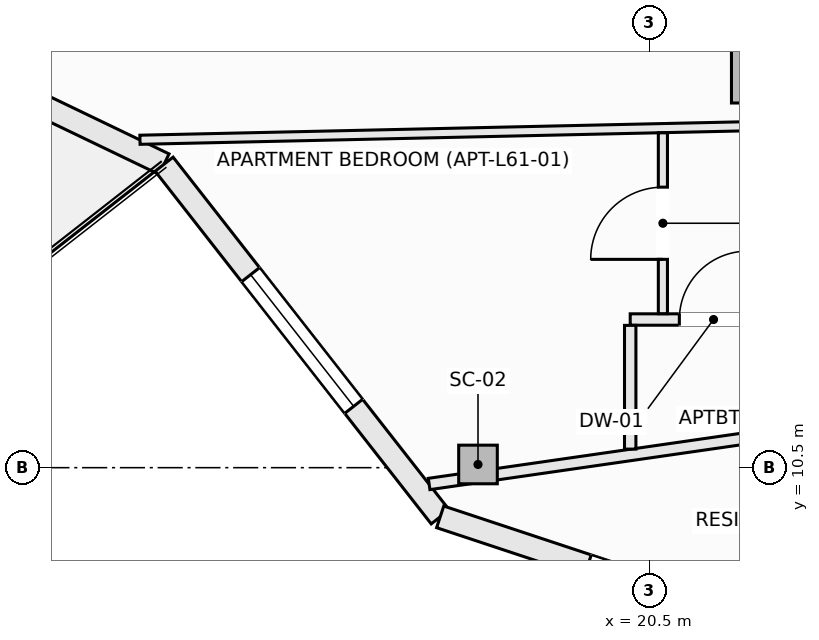
"""IFC4 building model, lengths in metres.
Left out: names, types, materials, properties, quantities, classifications, styles, units other than length and angle.
Written with IfcOpenShell. Run it as: python <this file> out.ifc"""

import sys

from ifc_helpers import new_model, si_unit, direction, frame, frame_2d, origin, origin_2d, place, context, subcontext, project, spatial, rectangle, hollow_rectangle, extrude, element, fill, save


model = new_model("IFC4")
c1 = context("Model", 3, precision=1e-05, world=origin(), true_north=direction((0.0, 1.0)))
c2 = subcontext(c1, "Body", "Model", "MODEL_VIEW")
j1 = project(units=[si_unit("LENGTHUNIT", "METRE"), si_unit("PLANEANGLEUNIT", "RADIAN")], contexts=[c1])
p1 = place(None, origin())
s1 = spatial("IfcSite", under=j1, at=p1, CompositionType="ELEMENT")
p2 = place(p1, origin())
s2 = spatial("IfcBuilding", under=s1, at=p2, CompositionType="ELEMENT")
p3 = place(p2, frame((0.0, 0.0, 229.4)))
s3 = spatial("IfcBuildingStorey", under=s2, at=p3, CompositionType="ELEMENT", Elevation=229.4)
p4 = place(p3, frame((18.247, 10.542, -0.27), z_axis=(0.0, 0.0, 1.0), x_axis=(1.0, 0.0, 0.0)))
e1 = element("IfcColumn", 1, at=p4, inside=s3, PredefinedType="COLUMN", context=c2, shape_type="SweptSolid", body=[
    extrude(hollow_rectangle(XDim=0.508, YDim=0.508, WallThickness=0.019, at=origin_2d()), origin(), (0.0, 0.0, 1.0), 3.3),
])
p5 = place(p3, frame((21.932, 15.648, -0.27), z_axis=(0.0, 0.0, 1.0), x_axis=(1.0, 0.0, 0.0)))
e2 = element("IfcColumn", 2, at=p5, inside=s3, PredefinedType="COLUMN", context=c2, shape_type="SweptSolid", body=[
    extrude(rectangle(XDim=0.7, YDim=0.7, at=origin_2d()), origin(), (0.0, 0.0, 1.0), 3.3),
])
p6 = place(p3, frame((8.691, 17.1, 0.0), z_axis=(0.0, 0.0, 1.0), x_axis=(0.901348331142, -0.433094892545, 0.0)))
e3 = element("IfcWall", 3, at=p6, inside=s3, PredefinedType="SOLIDWALL", context=c2, shape_type="SweptSolid", body=[
    extrude(rectangle(XDim=6.021, YDim=0.3, at=frame_2d((3.01, 0.0))), origin(), (0.0, 0.0, 1.0), 2.605),
])
p7 = place(p6, frame((1.91, 0.0, 0.72)))
e4 = element("IfcOpeningElement", 4, at=p7, cuts=e3, PredefinedType="OPENING", context=c2, shape_type="SweptSolid", body=[
    extrude(rectangle(XDim=2.2, YDim=1.65, at=frame_2d((1.1, 0.825))), frame((0.0, 0.16, 0.0), z_axis=(0.0, -1.0, 0.0), x_axis=(1.0, 0.0, 0.0)), (0.0, 0.0, 1.0), 0.32),
])
p8 = place(p3, frame((14.117, 14.493, 0.0), z_axis=(0.0, 0.0, 1.0), x_axis=(0.616450126935, -0.787393955401, 0.0)))
e5 = element("IfcWall", 5, at=p8, inside=s3, PredefinedType="SOLIDWALL", context=c2, shape_type="SweptSolid", body=[
    extrude(rectangle(XDim=5.893, YDim=0.3, at=frame_2d((2.946, 0.0))), origin(), (0.0, 0.0, 1.0), 2.605),
])
p9 = place(p8, frame((1.846, 0.0, 0.72)))
e6 = element("IfcOpeningElement", 6, at=p9, cuts=e5, PredefinedType="OPENING", context=c2, shape_type="SweptSolid", body=[
    extrude(rectangle(XDim=2.2, YDim=1.65, at=frame_2d((1.1, 0.825))), frame((0.0, 0.16, 0.0), z_axis=(0.0, -1.0, 0.0), x_axis=(1.0, 0.0, 0.0)), (0.0, 0.0, 1.0), 0.32),
])
p10 = place(p3, frame((17.75, 9.853, 0.0), z_axis=(0.0, 0.0, 1.0), x_axis=(0.949240877604, -0.314550085495, 0.0)))
e7 = element("IfcWall", 7, at=p10, inside=s3, PredefinedType="SOLIDWALL", context=c2, shape_type="SweptSolid", body=[
    extrude(rectangle(XDim=6.288, YDim=0.3, at=frame_2d((3.144, 0.0))), origin(), (0.0, 0.0, 1.0), 2.605),
])
p11 = place(p10, frame((2.044, 0.0, 0.72)))
e8 = element("IfcOpeningElement", 8, at=p11, cuts=e7, PredefinedType="OPENING", context=c2, shape_type="SweptSolid", body=[
    extrude(rectangle(XDim=2.2, YDim=1.65, at=frame_2d((1.1, 0.825))), frame((0.0, 0.16, 0.0), z_axis=(0.0, -1.0, 0.0), x_axis=(1.0, 0.0, 0.0)), (0.0, 0.0, 1.0), 0.32),
])
p12 = place(p3, frame((13.8, 14.814, 0.0), z_axis=(0.0, 0.0, 1.0), x_axis=(0.999752677802, 0.022239227231, 0.0)))
e9 = element("IfcWall", 9, at=p12, inside=s3, PredefinedType="PARTITIONING", context=c2, shape_type="SweptSolid", body=[
    extrude(rectangle(XDim=13.261, YDim=0.12, at=frame_2d((6.631, 0.0))), origin(), (0.0, 0.0, 1.0), 2.478),
])
p13 = place(p3, frame((17.604, 10.285, 0.0), z_axis=(0.0, 0.0, 1.0), x_axis=(0.989781675617, 0.142591144933, 0.0)))
e10 = element("IfcWall", 10, at=p13, inside=s3, PredefinedType="PARTITIONING", context=c2, shape_type="SweptSolid", body=[
    extrude(rectangle(XDim=9.612, YDim=0.15, at=frame_2d((4.806, 0.0))), origin(), (0.0, 0.0, 1.0), 2.605),
])
p14 = place(p3, frame((20.25, 12.449, 0.0), z_axis=(0.0, 0.0, 1.0), x_axis=(1.0, 0.0, 0.0)))
e11 = element("IfcWall", 11, at=p14, inside=s3, PredefinedType="PARTITIONING", context=c2, shape_type="SweptSolid", body=[
    extrude(rectangle(XDim=2.173, YDim=0.15, at=frame_2d((1.086, 0.0))), origin(), (0.0, 0.0, 1.0), 3.03),
])
p15 = place(p14, frame((0.646, 0.0, 0.0)))
e12 = element("IfcOpeningElement", 12, at=p15, cuts=e11, PredefinedType="OPENING", context=c2, shape_type="SweptSolid", body=[
    extrude(rectangle(XDim=0.9, YDim=2.1, at=frame_2d((0.45, 1.05))), frame((0.0, 0.085, 0.0), z_axis=(0.0, -1.0, 0.0), x_axis=(1.0, 0.0, 0.0)), (0.0, 0.0, 1.0), 0.17),
])
p16 = place(p3, frame((20.68, 12.526, 0.0), z_axis=(0.0, 0.0, 1.0), x_axis=(0.0, 1.0, 0.0)))
e13 = element("IfcWall", 13, at=p16, inside=s3, PredefinedType="PARTITIONING", context=c2, shape_type="SweptSolid", body=[
    extrude(rectangle(XDim=2.379, YDim=0.12, at=frame_2d((1.189, 0.0))), origin(), (0.0, 0.0, 1.0), 2.478),
])
p17 = place(p16, frame((0.715, 0.0, 0.0)))
e14 = element("IfcOpeningElement", 14, at=p17, cuts=e13, PredefinedType="OPENING", context=c2, shape_type="SweptSolid", body=[
    extrude(rectangle(XDim=0.95, YDim=2.1, at=frame_2d((0.475, 1.05))), frame((0.0, 0.07, 0.0), z_axis=(0.0, -1.0, 0.0), x_axis=(1.0, 0.0, 0.0)), (0.0, 0.0, 1.0), 0.14),
])
p18 = place(p3, frame((20.25, 10.744, 0.0), z_axis=(0.0, 0.0, 1.0), x_axis=(0.0, 1.0, 0.0)))
e15 = element("IfcWall", 15, at=p18, inside=s3, PredefinedType="PARTITIONING", context=c2, shape_type="SweptSolid", body=[
    extrude(rectangle(XDim=1.628, YDim=0.15, at=frame_2d((0.814, 0.0))), origin(), (0.0, 0.0, 1.0), 3.03),
])
p19 = place(p9, origin())
e16 = element("IfcWindow", 16, at=p19, inside=s3, PartitioningType="SINGLE_PANEL", PredefinedType="WINDOW", context=c2, shape_type="SweptSolid", body=[
    extrude(rectangle(XDim=2.2, YDim=1.65, at=frame_2d((1.1, 0.825))), frame((0.0, 0.03, 0.0), z_axis=(0.0, -1.0, 0.0), x_axis=(1.0, 0.0, 0.0)), (0.0, 0.0, 1.0), 0.06),
])
fill(e6, e16)
p20 = place(p15, origin())
e17 = element("IfcDoor", 17, at=p20, inside=s3, OperationType="SINGLE_SWING_RIGHT", PredefinedType="DOOR", context=c2, shape_type="SweptSolid", body=[
    extrude(rectangle(XDim=0.9, YDim=2.1, at=frame_2d((0.45, 1.05))), frame((0.0, 0.025, 0.0), z_axis=(0.0, -1.0, 0.0), x_axis=(1.0, 0.0, 0.0)), (0.0, 0.0, 1.0), 0.05),
])
fill(e12, e17)
p21 = place(p17, origin())
e18 = element("IfcDoor", 18, at=p21, inside=s3, OperationType="SINGLE_SWING_LEFT", PredefinedType="DOOR", context=c2, shape_type="SweptSolid", body=[
    extrude(rectangle(XDim=0.95, YDim=2.1, at=frame_2d((0.475, 1.05))), frame((0.0, 0.025, 0.0), z_axis=(0.0, -1.0, 0.0), x_axis=(1.0, 0.0, 0.0)), (0.0, 0.0, 1.0), 0.05),
])
fill(e14, e18)
save(model, sys.argv[1])
